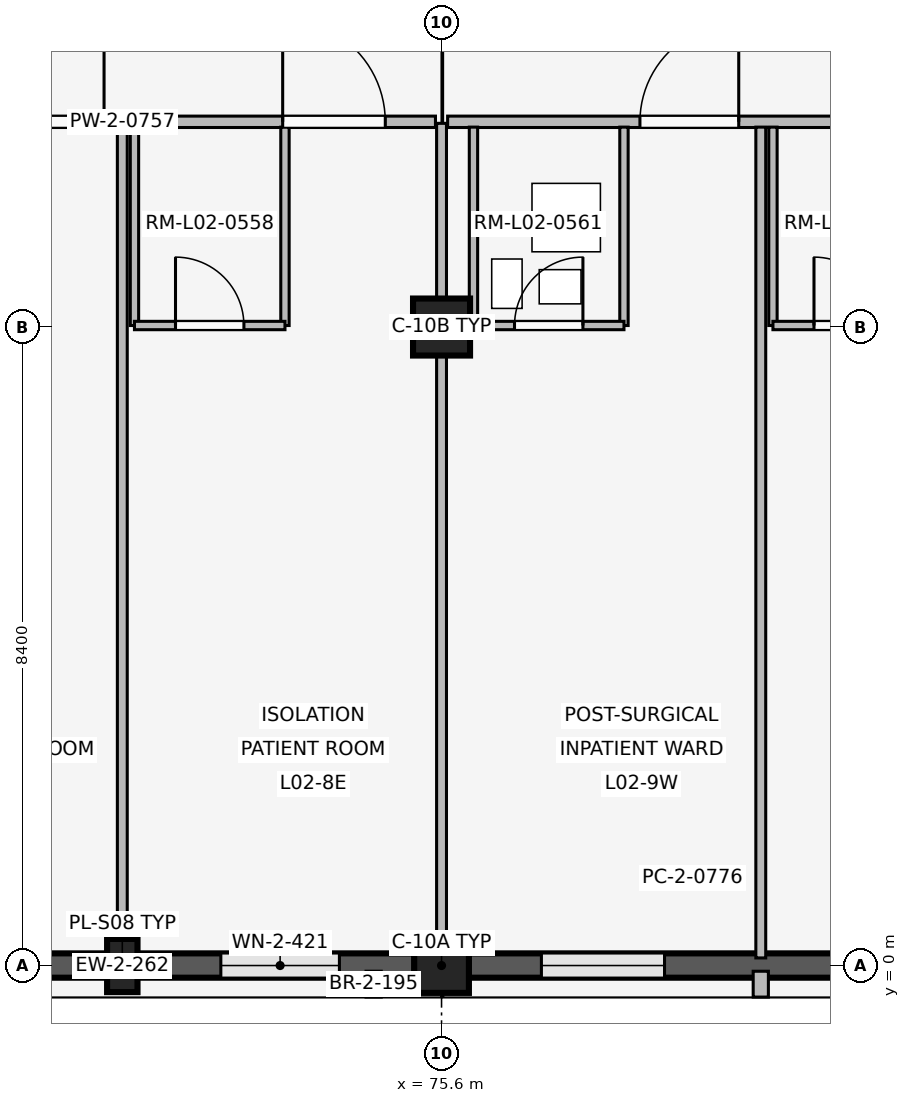
"""IFC4 building model, lengths in metres.
Left out: names, types, materials, properties, quantities, classifications, styles, units other than length and angle.
Written with IfcOpenShell. Run it as: python <this file> out.ifc"""

import sys

from ifc_helpers import new_model, si_unit, direction, frame, frame_2d, origin, origin_2d, place, context, subcontext, project, spatial, rectangle, extrude, element, fill, save


model = new_model("IFC4")
c1 = context("Model", 3, precision=1e-05, world=origin(), true_north=direction((0.0, 1.0)))
c2 = subcontext(c1, "Body", "Model", "MODEL_VIEW")
j1 = project(units=[si_unit("LENGTHUNIT", "METRE"), si_unit("PLANEANGLEUNIT", "RADIAN")], contexts=[c1])
p1 = place(None, origin())
s1 = spatial("IfcSite", under=j1, at=p1, CompositionType="ELEMENT")
p2 = place(p1, origin())
s2 = spatial("IfcBuilding", under=s1, at=p2, CompositionType="ELEMENT")
p3 = place(p2, frame((0.0, 0.0, 8.1)))
s3 = spatial("IfcBuildingStorey", under=s2, at=p3, CompositionType="ELEMENT", Elevation=8.1)
p4 = place(p3, frame((75.6, 0.0, 0.0), z_axis=(0.0, 0.0, 1.0), x_axis=(1.0, 0.0, 0.0)))
e1 = element("IfcColumn", 1, at=p4, inside=s3, PredefinedType="COLUMN", context=c2, shape_type="SweptSolid", body=[
    extrude(rectangle(XDim=0.72, YDim=0.72, at=origin_2d()), origin(), (0.0, 0.0, 1.0), 4.8),
])
p5 = place(p3, frame((75.6, 8.4, 0.0), z_axis=(0.0, 0.0, 1.0), x_axis=(1.0, 0.0, 0.0)))
e2 = element("IfcColumn", 2, at=p5, inside=s3, PredefinedType="COLUMN", context=c2, shape_type="SweptSolid", body=[
    extrude(rectangle(XDim=0.75, YDim=0.75, at=origin_2d()), origin(), (0.0, 0.0, 1.0), 4.8),
])
p6 = place(p3, frame((71.4, 0.0, 0.0), z_axis=(0.0, 0.0, 1.0), x_axis=(1.0, 0.0, 0.0)))
e3 = element("IfcColumn", 3, at=p6, inside=s3, PredefinedType="PILASTER", context=c2, shape_type="SweptSolid", body=[
    extrude(rectangle(XDim=0.4, YDim=0.7, at=origin_2d()), origin(), (0.0, 0.0, 1.0), 4.8),
])
p7 = place(p3, frame((75.245, 0.0, 0.0), z_axis=(0.0, 0.0, 1.0), x_axis=(-1.0, 0.0, 0.0)))
e4 = element("IfcWall", 4, at=p7, inside=s3, PredefinedType="SOLIDWALL", context=c2, shape_type="SweptSolid", body=[
    extrude(rectangle(XDim=7.69, YDim=0.32, at=frame_2d((3.845, 0.0))), origin(), (0.0, 0.0, 1.0), 3.86),
])
p8 = place(p7, frame((0.989, 0.0, 0.85)))
e5 = element("IfcOpeningElement", 5, at=p8, cuts=e4, PredefinedType="OPENING", context=c2, shape_type="SweptSolid", body=[
    extrude(rectangle(XDim=1.56, YDim=1.7, at=frame_2d((0.78, 0.85))), frame((0.0, 0.17, 0.0), z_axis=(0.0, -1.0, 0.0), x_axis=(1.0, 0.0, 0.0)), (0.0, 0.0, 1.0), 0.34),
])
p9 = place(p7, frame((5.141, 0.0, 0.85)))
e6 = element("IfcOpeningElement", 6, at=p9, cuts=e4, PredefinedType="OPENING", context=c2, shape_type="SweptSolid", body=[
    extrude(rectangle(XDim=1.56, YDim=1.7, at=frame_2d((0.78, 0.85))), frame((0.0, 0.17, 0.0), z_axis=(0.0, -1.0, 0.0), x_axis=(1.0, 0.0, 0.0)), (0.0, 0.0, 1.0), 0.34),
])
p10 = place(p3, frame((74.707, -0.075, 0.0), z_axis=(0.0, 0.0, 1.0), x_axis=(0.0, -1.0, 0.0)))
e7 = element("IfcWall", 7, at=p10, inside=s3, PredefinedType="ELEMENTEDWALL", context=c2, shape_type="SweptSolid", body=[
    extrude(rectangle(XDim=0.34, YDim=0.2, at=frame_2d((0.17, 0.0))), origin(), (0.0, 0.0, 1.0), 3.84),
])
p11 = place(p3, frame((83.645, 0.0, 0.0), z_axis=(0.0, 0.0, 1.0), x_axis=(-1.0, 0.0, 0.0)))
e8 = element("IfcWall", 8, at=p11, inside=s3, PredefinedType="SOLIDWALL", context=c2, shape_type="SweptSolid", body=[
    extrude(rectangle(XDim=7.69, YDim=0.32, at=frame_2d((3.845, 0.0))), origin(), (0.0, 0.0, 1.0), 3.86),
])
p12 = place(p11, frame((0.959, 0.0, 0.85)))
e9 = element("IfcOpeningElement", 9, at=p12, cuts=e8, PredefinedType="OPENING", context=c2, shape_type="SweptSolid", body=[
    extrude(rectangle(XDim=1.62, YDim=1.8, at=frame_2d((0.81, 0.9))), frame((0.0, 0.17, 0.0), z_axis=(0.0, -1.0, 0.0), x_axis=(1.0, 0.0, 0.0)), (0.0, 0.0, 1.0), 0.34),
])
p13 = place(p11, frame((5.111, 0.0, 0.85)))
e10 = element("IfcOpeningElement", 10, at=p13, cuts=e8, PredefinedType="OPENING", context=c2, shape_type="SweptSolid", body=[
    extrude(rectangle(XDim=1.62, YDim=1.8, at=frame_2d((0.81, 0.9))), frame((0.0, 0.17, 0.0), z_axis=(0.0, -1.0, 0.0), x_axis=(1.0, 0.0, 0.0)), (0.0, 0.0, 1.0), 0.34),
])
p14 = place(p3, frame((79.8, -0.075, 0.0), z_axis=(0.0, 0.0, 1.0), x_axis=(0.0, -1.0, 0.0)))
e11 = element("IfcWall", 11, at=p14, inside=s3, PredefinedType="ELEMENTEDWALL", context=c2, shape_type="SweptSolid", body=[
    extrude(rectangle(XDim=0.34, YDim=0.2, at=frame_2d((0.17, 0.0))), origin(), (0.0, 0.0, 1.0), 3.84),
])
p15 = place(p3, frame((67.28, 11.1, 0.0), z_axis=(0.0, 0.0, 1.0), x_axis=(1.0, 0.0, 0.0)))
e12 = element("IfcWall", 12, at=p15, inside=s3, PredefinedType="PARTITIONING", context=c2, shape_type="SweptSolid", body=[
    extrude(rectangle(XDim=8.24, YDim=0.15, at=frame_2d((4.12, 0.0))), origin(), (0.0, 0.0, 1.0), 3.84),
])
p16 = place(p15, frame((2.53, 0.0, 0.0)))
e13 = element("IfcOpeningElement", 13, at=p16, cuts=e12, PredefinedType="OPENING", context=c2, shape_type="SweptSolid", body=[
    extrude(rectangle(XDim=1.35, YDim=2.25, at=frame_2d((0.675, 1.125))), frame((0.0, 0.085, 0.0), z_axis=(0.0, -1.0, 0.0), x_axis=(1.0, 0.0, 0.0)), (0.0, 0.0, 1.0), 0.17),
])
p17 = place(p15, frame((6.23, 0.0, 0.0)))
e14 = element("IfcOpeningElement", 14, at=p17, cuts=e12, PredefinedType="OPENING", context=c2, shape_type="SweptSolid", body=[
    extrude(rectangle(XDim=1.35, YDim=2.25, at=frame_2d((0.675, 1.125))), frame((0.0, 0.085, 0.0), z_axis=(0.0, -1.0, 0.0), x_axis=(1.0, 0.0, 0.0)), (0.0, 0.0, 1.0), 0.17),
])
p18 = place(p3, frame((71.4, 0.1, 0.0), z_axis=(0.0, 0.0, 1.0), x_axis=(0.0, 1.0, 0.0)))
e15 = element("IfcWall", 15, at=p18, inside=s3, PredefinedType="PARTITIONING", context=c2, shape_type="SweptSolid", body=[
    extrude(rectangle(XDim=10.93, YDim=0.13, at=frame_2d((5.465, 0.0))), origin(), (0.0, 0.0, 1.0), 3.84),
])
for number, where, z_axis, x_axis in (
    (16, (71.56, 8.42, 0.0), (0.0, 0.0, 1.0), (0.0, 1.0, 0.0)),
    (17, (73.54, 8.42, 0.0), (0.0, 0.0, 1.0), (0.0, 1.0, 0.0)),
):
    element("IfcWall", number, at=place(p3, frame(where, z_axis=z_axis, x_axis=x_axis)), inside=s3, PredefinedType="PARTITIONING", context=c2, shape_type="SweptSolid", body=[
        extrude(rectangle(XDim=2.61, YDim=0.11, at=frame_2d((1.305, 0.0))), origin(), (0.0, 0.0, 1.0), 3.84),
    ])
p19 = place(p3, frame((71.56, 8.42, 0.0), z_axis=(0.0, 0.0, 1.0), x_axis=(1.0, 0.0, 0.0)))
e18 = element("IfcWall", 18, at=p19, inside=s3, PredefinedType="PARTITIONING", context=c2, shape_type="SweptSolid", body=[
    extrude(rectangle(XDim=1.98, YDim=0.11, at=frame_2d((0.99, 0.0))), origin(), (0.0, 0.0, 1.0), 3.84),
])
p20 = place(p19, frame((0.54, 0.0, 0.0)))
e19 = element("IfcOpeningElement", 19, at=p20, cuts=e18, PredefinedType="OPENING", context=c2, shape_type="SweptSolid", body=[
    extrude(rectangle(XDim=0.9, YDim=2.1, at=frame_2d((0.45, 1.05))), frame((0.0, 0.065, 0.0), z_axis=(0.0, -1.0, 0.0), x_axis=(1.0, 0.0, 0.0)), (0.0, 0.0, 1.0), 0.13),
])
p21 = place(p3, frame((75.6, 0.14, 0.0), z_axis=(0.0, 0.0, 1.0), x_axis=(0.0, 1.0, 0.0)))
e20 = element("IfcWall", 20, at=p21, inside=s3, PredefinedType="PARTITIONING", context=c2, shape_type="SweptSolid", body=[
    extrude(rectangle(XDim=10.94, YDim=0.13, at=frame_2d((5.47, 0.0))), origin(), (0.0, 0.0, 1.0), 3.84),
])
p22 = place(p3, frame((75.68, 11.1, 0.0), z_axis=(0.0, 0.0, 1.0), x_axis=(1.0, 0.0, 0.0)))
e21 = element("IfcWall", 21, at=p22, inside=s3, PredefinedType="PARTITIONING", context=c2, shape_type="SweptSolid", body=[
    extrude(rectangle(XDim=8.24, YDim=0.15, at=frame_2d((4.12, 0.0))), origin(), (0.0, 0.0, 1.0), 3.84),
])
p23 = place(p22, frame((2.53, 0.0, 0.0)))
e22 = element("IfcOpeningElement", 22, at=p23, cuts=e21, PredefinedType="OPENING", context=c2, shape_type="SweptSolid", body=[
    extrude(rectangle(XDim=1.3, YDim=2.25, at=frame_2d((0.65, 1.125))), frame((0.0, 0.085, 0.0), z_axis=(0.0, -1.0, 0.0), x_axis=(1.0, 0.0, 0.0)), (0.0, 0.0, 1.0), 0.17),
])
p24 = place(p22, frame((6.23, 0.0, 0.0)))
e23 = element("IfcOpeningElement", 23, at=p24, cuts=e21, PredefinedType="OPENING", context=c2, shape_type="SweptSolid", body=[
    extrude(rectangle(XDim=1.3, YDim=2.25, at=frame_2d((0.65, 1.125))), frame((0.0, 0.085, 0.0), z_axis=(0.0, -1.0, 0.0), x_axis=(1.0, 0.0, 0.0)), (0.0, 0.0, 1.0), 0.17),
])
p25 = place(p3, frame((79.8, 0.1, 0.0), z_axis=(0.0, 0.0, 1.0), x_axis=(0.0, 1.0, 0.0)))
e24 = element("IfcWall", 24, at=p25, inside=s3, PredefinedType="PARTITIONING", context=c2, shape_type="SweptSolid", body=[
    extrude(rectangle(XDim=10.93, YDim=0.13, at=frame_2d((5.465, 0.0))), origin(), (0.0, 0.0, 1.0), 3.84),
])
for number, where, z_axis, x_axis in (
    (25, (76.02, 8.42, 0.0), (0.0, 0.0, 1.0), (0.0, 1.0, 0.0)),
    (26, (78.0, 8.42, 0.0), (0.0, 0.0, 1.0), (0.0, 1.0, 0.0)),
):
    element("IfcWall", number, at=place(p3, frame(where, z_axis=z_axis, x_axis=x_axis)), inside=s3, PredefinedType="PARTITIONING", context=c2, shape_type="SweptSolid", body=[
        extrude(rectangle(XDim=2.61, YDim=0.11, at=frame_2d((1.305, 0.0))), origin(), (0.0, 0.0, 1.0), 3.84),
    ])
p26 = place(p3, frame((76.02, 8.42, 0.0), z_axis=(0.0, 0.0, 1.0), x_axis=(1.0, 0.0, 0.0)))
e27 = element("IfcWall", 27, at=p26, inside=s3, PredefinedType="PARTITIONING", context=c2, shape_type="SweptSolid", body=[
    extrude(rectangle(XDim=1.98, YDim=0.11, at=frame_2d((0.99, 0.0))), origin(), (0.0, 0.0, 1.0), 3.84),
])
p27 = place(p26, frame((0.54, 0.0, 0.0)))
e28 = element("IfcOpeningElement", 28, at=p27, cuts=e27, PredefinedType="OPENING", context=c2, shape_type="SweptSolid", body=[
    extrude(rectangle(XDim=0.9, YDim=2.1, at=frame_2d((0.45, 1.05))), frame((0.0, 0.065, 0.0), z_axis=(0.0, -1.0, 0.0), x_axis=(1.0, 0.0, 0.0)), (0.0, 0.0, 1.0), 0.13),
])
p28 = place(p3, frame((79.96, 8.42, 0.0), z_axis=(0.0, 0.0, 1.0), x_axis=(0.0, 1.0, 0.0)))
e29 = element("IfcWall", 29, at=p28, inside=s3, PredefinedType="PARTITIONING", context=c2, shape_type="SweptSolid", body=[
    extrude(rectangle(XDim=2.61, YDim=0.11, at=frame_2d((1.305, 0.0))), origin(), (0.0, 0.0, 1.0), 3.84),
])
p29 = place(p3, frame((79.96, 8.42, 0.0), z_axis=(0.0, 0.0, 1.0), x_axis=(1.0, 0.0, 0.0)))
e30 = element("IfcWall", 30, at=p29, inside=s3, PredefinedType="PARTITIONING", context=c2, shape_type="SweptSolid", body=[
    extrude(rectangle(XDim=1.98, YDim=0.11, at=frame_2d((0.99, 0.0))), origin(), (0.0, 0.0, 1.0), 3.84),
])
p30 = place(p29, frame((0.54, 0.0, 0.0)))
e31 = element("IfcOpeningElement", 31, at=p30, cuts=e30, PredefinedType="OPENING", context=c2, shape_type="SweptSolid", body=[
    extrude(rectangle(XDim=0.9, YDim=2.1, at=frame_2d((0.45, 1.05))), frame((0.0, 0.065, 0.0), z_axis=(0.0, -1.0, 0.0), x_axis=(1.0, 0.0, 0.0)), (0.0, 0.0, 1.0), 0.13),
])
p31 = place(p3, frame((78.45, 1.15, 0.0), z_axis=(0.0, 0.0, 1.0), x_axis=(1.0, 0.0, 0.0)))
e32 = element("IfcWall", 32, at=p31, inside=s3, PredefinedType="PLUMBINGWALL", context=c2, shape_type="SweptSolid", body=[
    extrude(rectangle(XDim=0.9, YDim=0.24, at=frame_2d((0.45, 0.0))), origin(), (0.0, 0.0, 1.0), 3.84),
])
p32 = place(p8, origin())
e33 = element("IfcWindow", 33, at=p32, inside=s3, PartitioningType="SINGLE_PANEL", PredefinedType="WINDOW", context=c2, shape_type="SweptSolid", body=[
    extrude(rectangle(XDim=1.56, YDim=1.7, at=frame_2d((0.78, 0.85))), frame((0.0, 0.03, 0.0), z_axis=(0.0, -1.0, 0.0), x_axis=(1.0, 0.0, 0.0)), (0.0, 0.0, 1.0), 0.06),
])
fill(e5, e33)
p33 = place(p13, origin())
e34 = element("IfcWindow", 34, at=p33, inside=s3, PartitioningType="SINGLE_PANEL", PredefinedType="WINDOW", context=c2, shape_type="SweptSolid", body=[
    extrude(rectangle(XDim=1.62, YDim=1.8, at=frame_2d((0.81, 0.9))), frame((0.0, 0.03, 0.0), z_axis=(0.0, -1.0, 0.0), x_axis=(1.0, 0.0, 0.0)), (0.0, 0.0, 1.0), 0.06),
])
fill(e10, e34)
p34 = place(p16, origin())
e35 = element("IfcDoor", 35, at=p34, inside=s3, OperationType="SINGLE_SWING_RIGHT", PredefinedType="DOOR", context=c2, shape_type="SweptSolid", body=[
    extrude(rectangle(XDim=1.35, YDim=2.25, at=frame_2d((0.675, 1.125))), frame((0.0, 0.025, 0.0), z_axis=(0.0, -1.0, 0.0), x_axis=(1.0, 0.0, 0.0)), (0.0, 0.0, 1.0), 0.05),
])
fill(e13, e35)
p35 = place(p17, origin())
e36 = element("IfcDoor", 36, at=p35, inside=s3, OperationType="SINGLE_SWING_LEFT", PredefinedType="DOOR", context=c2, shape_type="SweptSolid", body=[
    extrude(rectangle(XDim=1.35, YDim=2.25, at=frame_2d((0.675, 1.125))), frame((0.0, 0.025, 0.0), z_axis=(0.0, -1.0, 0.0), x_axis=(1.0, 0.0, 0.0)), (0.0, 0.0, 1.0), 0.05),
])
fill(e14, e36)
p36 = place(p20, origin())
e37 = element("IfcDoor", 37, at=p36, inside=s3, OperationType="SINGLE_SWING_LEFT", PredefinedType="DOOR", context=c2, shape_type="SweptSolid", body=[
    extrude(rectangle(XDim=0.9, YDim=2.1, at=frame_2d((0.45, 1.05))), frame((0.0, 0.025, 0.0), z_axis=(0.0, -1.0, 0.0), x_axis=(1.0, 0.0, 0.0)), (0.0, 0.0, 1.0), 0.05),
])
fill(e19, e37)
p37 = place(p23, origin())
e38 = element("IfcDoor", 38, at=p37, inside=s3, OperationType="SINGLE_SWING_RIGHT", PredefinedType="DOOR", context=c2, shape_type="SweptSolid", body=[
    extrude(rectangle(XDim=1.3, YDim=2.25, at=frame_2d((0.65, 1.125))), frame((0.0, 0.025, 0.0), z_axis=(0.0, -1.0, 0.0), x_axis=(1.0, 0.0, 0.0)), (0.0, 0.0, 1.0), 0.05),
])
fill(e22, e38)
p38 = place(p27, origin())
e39 = element("IfcDoor", 39, at=p38, inside=s3, OperationType="SINGLE_SWING_RIGHT", PredefinedType="DOOR", context=c2, shape_type="SweptSolid", body=[
    extrude(rectangle(XDim=0.9, YDim=2.1, at=frame_2d((0.45, 1.05))), frame((0.0, 0.025, 0.0), z_axis=(0.0, -1.0, 0.0), x_axis=(1.0, 0.0, 0.0)), (0.0, 0.0, 1.0), 0.05),
])
fill(e28, e39)
p39 = place(p30, origin())
e40 = element("IfcDoor", 40, at=p39, inside=s3, OperationType="SINGLE_SWING_LEFT", PredefinedType="DOOR", context=c2, shape_type="SweptSolid", body=[
    extrude(rectangle(XDim=0.9, YDim=2.1, at=frame_2d((0.45, 1.05))), frame((0.0, 0.025, 0.0), z_axis=(0.0, -1.0, 0.0), x_axis=(1.0, 0.0, 0.0)), (0.0, 0.0, 1.0), 0.05),
])
fill(e31, e40)
save(model, sys.argv[1])
